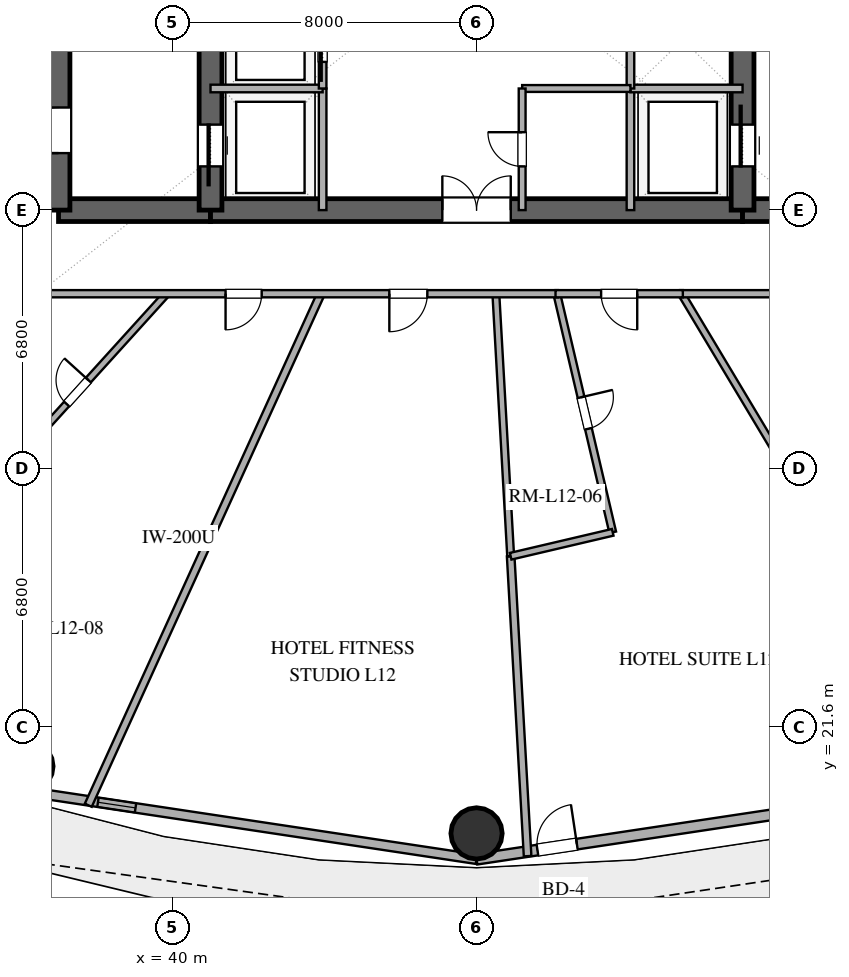
"""IFC4 building model, lengths in metres.
Left out: names, types, materials, properties, quantities, classifications, styles, units other than length and angle.
Written with IfcOpenShell. Run it as: python <this file> out.ifc"""

import sys

from ifc_helpers import new_model, si_unit, direction, frame, frame_2d, origin, origin_2d, place, context, subcontext, project, spatial, rectangle, hollow_circle, extrude, element, fill, save


model = new_model("IFC4")
c1 = context("Model", 3, precision=1e-05, world=origin(), true_north=direction((0.0, 1.0)))
c2 = subcontext(c1, "Body", "Model", "MODEL_VIEW")
j1 = project(units=[si_unit("LENGTHUNIT", "METRE"), si_unit("PLANEANGLEUNIT", "RADIAN")], contexts=[c1])
p1 = place(None, origin())
s1 = spatial("IfcSite", under=j1, at=p1, CompositionType="ELEMENT")
p2 = place(p1, origin())
s2 = spatial("IfcBuilding", under=s1, at=p2, CompositionType="ELEMENT")
p3 = place(p2, frame((0.0, 0.0, 53.4)))
s3 = spatial("IfcBuildingStorey", under=s2, at=p3, CompositionType="ELEMENT", Elevation=53.4)
p4 = place(p3, frame((37.0, 35.2, 0.0), z_axis=(0.0, 0.0, 1.0), x_axis=(1.0, 0.0, 0.0)))
e1 = element("IfcWall", 1, at=p4, inside=s3, PredefinedType="SHEAR", context=c2, shape_type="SweptSolid", body=[
    extrude(rectangle(XDim=4.0, YDim=0.6, at=frame_2d((2.0, 0.0))), origin(), (0.0, 0.0, 1.0), 3.38),
])
p5 = place(p3, frame((41.0, 35.2, 0.0), z_axis=(0.0, 0.0, 1.0), x_axis=(1.0, 0.0, 0.0)))
e2 = element("IfcWall", 2, at=p5, inside=s3, PredefinedType="SHEAR", context=c2, shape_type="SweptSolid", body=[
    extrude(rectangle(XDim=14.0, YDim=0.6, at=frame_2d((7.0, 0.0))), origin(), (0.0, 0.0, 1.0), 3.38),
])
p6 = place(p5, frame((6.1, 0.0, 0.0)))
e3 = element("IfcOpeningElement", 3, at=p6, cuts=e2, PredefinedType="OPENING", context=c2, shape_type="SweptSolid", body=[
    extrude(rectangle(XDim=1.8, YDim=2.25, at=frame_2d((0.9, 1.125))), frame((0.0, 0.31, 0.0), z_axis=(0.0, -1.0, 0.0), x_axis=(1.0, 0.0, 0.0)), (0.0, 0.0, 1.0), 0.62),
])
p7 = place(p3, frame((55.0, 35.2, 0.0), z_axis=(0.0, 0.0, 1.0), x_axis=(1.0, 0.0, 0.0)))
e4 = element("IfcWall", 4, at=p7, inside=s3, PredefinedType="SHEAR", context=c2, shape_type="SweptSolid", body=[
    extrude(rectangle(XDim=4.0, YDim=0.6, at=frame_2d((2.0, 0.0))), origin(), (0.0, 0.0, 1.0), 3.38),
])
p8 = place(p3, frame((37.0, 35.2, 0.0), z_axis=(0.0, 0.0, 1.0), x_axis=(0.0, 1.0, 0.0)))
e5 = element("IfcWall", 5, at=p8, inside=s3, PredefinedType="SHEAR", context=c2, shape_type="SweptSolid", body=[
    extrude(rectangle(XDim=13.6, YDim=0.6, at=frame_2d((6.8, 0.0))), origin(), (0.0, 0.0, 1.0), 3.38),
])
p9 = place(p8, frame((1.5, 0.0, 0.0)))
e6 = element("IfcOpeningElement", 6, at=p9, cuts=e5, PredefinedType="OPENING", context=c2, shape_type="SweptSolid", body=[
    extrude(rectangle(XDim=1.2, YDim=2.15, at=frame_2d((0.6, 1.075))), frame((0.0, 0.31, 0.0), z_axis=(0.0, -1.0, 0.0), x_axis=(1.0, 0.0, 0.0)), (0.0, 0.0, 1.0), 0.62),
])
p10 = place(p3, frame((41.0, 35.2, 0.0), z_axis=(0.0, 0.0, 1.0), x_axis=(0.0, 1.0, 0.0)))
e7 = element("IfcWall", 7, at=p10, inside=s3, PredefinedType="SHEAR", context=c2, shape_type="SweptSolid", body=[
    extrude(rectangle(XDim=13.6, YDim=0.6, at=frame_2d((6.8, 0.0))), origin(), (0.0, 0.0, 1.0), 3.38),
])
p11 = place(p10, frame((1.15, 0.0, 0.0)))
e8 = element("IfcOpeningElement", 8, at=p11, cuts=e7, PredefinedType="OPENING", context=c2, shape_type="SweptSolid", body=[
    extrude(rectangle(XDim=1.1, YDim=2.2, at=frame_2d((0.55, 1.1))), frame((0.0, 0.31, 0.0), z_axis=(0.0, -1.0, 0.0), x_axis=(1.0, 0.0, 0.0)), (0.0, 0.0, 1.0), 0.62),
])
p12 = place(p3, frame((55.0, 35.2, 0.0), z_axis=(0.0, 0.0, 1.0), x_axis=(0.0, 1.0, 0.0)))
e9 = element("IfcWall", 9, at=p12, inside=s3, PredefinedType="SHEAR", context=c2, shape_type="SweptSolid", body=[
    extrude(rectangle(XDim=13.6, YDim=0.6, at=frame_2d((6.8, 0.0))), origin(), (0.0, 0.0, 1.0), 3.38),
])
p13 = place(p12, frame((1.15, 0.0, 0.0)))
e10 = element("IfcOpeningElement", 10, at=p13, cuts=e9, PredefinedType="OPENING", context=c2, shape_type="SweptSolid", body=[
    extrude(rectangle(XDim=1.1, YDim=2.2, at=frame_2d((0.55, 1.1))), frame((0.0, 0.31, 0.0), z_axis=(0.0, -1.0, 0.0), x_axis=(1.0, 0.0, 0.0)), (0.0, 0.0, 1.0), 0.62),
])
for number, where, z_axis, x_axis in (
    (11, (36.182, 20.566, 0.0), (0.0, 0.0, 1.0), (1.0, 0.0, 0.0)),
    (12, (48.0, 18.8, 0.0), (0.0, 0.0, 1.0), (1.0, 0.0, 0.0)),
):
    element("IfcColumn", number, at=place(p3, frame(where, z_axis=z_axis, x_axis=x_axis)), inside=s3, PredefinedType="COLUMN", context=c2, shape_type="SweptSolid", body=[
        extrude(hollow_circle(Radius=0.675, WallThickness=0.036, at=origin_2d()), origin(), (0.0, 0.0, 1.0), 3.38),
    ])
p14 = place(p3, frame((35.922, 19.938, 0.0), z_axis=(0.0, 0.0, 1.0), x_axis=(0.988864835849, -0.148816452121, 0.0)))
e13 = element("IfcWall", 13, at=p14, inside=s3, PredefinedType="SOLIDWALL", context=c2, shape_type="SweptSolid", body=[
    extrude(rectangle(XDim=12.214, YDim=0.25, at=frame_2d((6.107, 0.0))), origin(), (0.0, 0.0, 1.0), 3.38),
])
p15 = place(p14, frame((2.139, 0.0, 1.42)))
e14 = element("IfcOpeningElement", 14, at=p15, cuts=e13, PredefinedType="OPENING", context=c2, shape_type="SweptSolid", body=[
    extrude(rectangle(XDim=1.0, YDim=1.05, at=frame_2d((0.5, 0.525))), frame((0.0, 0.135, 0.0), z_axis=(0.0, -1.0, 0.0), x_axis=(1.0, 0.0, 0.0)), (0.0, 0.0, 1.0), 0.27),
])
p16 = place(p3, frame((48.0, 18.12, 0.0), z_axis=(0.0, 0.0, 1.0), x_axis=(0.988864835849, 0.148816452121, 0.0)))
e15 = element("IfcWall", 15, at=p16, inside=s3, PredefinedType="SOLIDWALL", context=c2, shape_type="SweptSolid", body=[
    extrude(rectangle(XDim=12.214, YDim=0.28, at=frame_2d((6.107, 0.0))), origin(), (0.0, 0.0, 1.0), 3.38),
])
p17 = place(p16, frame((1.621, 0.0, 0.0)))
e16 = element("IfcOpeningElement", 16, at=p17, cuts=e15, PredefinedType="OPENING", context=c2, shape_type="SweptSolid", body=[
    extrude(rectangle(XDim=1.05, YDim=2.2, at=frame_2d((0.525, 1.1))), frame((0.0, 0.15, 0.0), z_axis=(0.0, -1.0, 0.0), x_axis=(1.0, 0.0, 0.0)), (0.0, 0.0, 1.0), 0.3),
])
p18 = place(p3, frame((43.95, 35.2, 0.0), z_axis=(0.0, 0.0, 1.0), x_axis=(0.0, 1.0, 0.0)))
e17 = element("IfcWall", 17, at=p18, inside=s3, PredefinedType="SOLIDWALL", context=c2, shape_type="SweptSolid", body=[
    extrude(rectangle(XDim=3.2, YDim=0.2, at=frame_2d((1.6, 0.0))), origin(), (0.0, 0.0, 1.0), 2.74),
])
p19 = place(p3, frame((41.0, 38.4, 0.0), z_axis=(0.0, 0.0, 1.0), x_axis=(1.0, 0.0, 0.0)))
e18 = element("IfcWall", 18, at=p19, inside=s3, PredefinedType="SOLIDWALL", context=c2, shape_type="SweptSolid", body=[
    extrude(rectangle(XDim=2.95, YDim=0.2, at=frame_2d((1.475, 0.0))), origin(), (0.0, 0.0, 1.0), 2.74),
])
p20 = place(p3, frame((52.05, 35.2, 0.0), z_axis=(0.0, 0.0, 1.0), x_axis=(0.0, 1.0, 0.0)))
e19 = element("IfcWall", 19, at=p20, inside=s3, PredefinedType="SOLIDWALL", context=c2, shape_type="SweptSolid", body=[
    extrude(rectangle(XDim=3.2, YDim=0.2, at=frame_2d((1.6, 0.0))), origin(), (0.0, 0.0, 1.0), 2.74),
])
p21 = place(p3, frame((52.05, 38.4, 0.0), z_axis=(0.0, 0.0, 1.0), x_axis=(1.0, 0.0, 0.0)))
e20 = element("IfcWall", 20, at=p21, inside=s3, PredefinedType="SOLIDWALL", context=c2, shape_type="SweptSolid", body=[
    extrude(rectangle(XDim=2.95, YDim=0.2, at=frame_2d((1.475, 0.0))), origin(), (0.0, 0.0, 1.0), 2.74),
])
p22 = place(p3, frame((43.95, 38.4, 0.0), z_axis=(0.0, 0.0, 1.0), x_axis=(0.0, 1.0, 0.0)))
e21 = element("IfcWall", 21, at=p22, inside=s3, PredefinedType="SOLIDWALL", context=c2, shape_type="SweptSolid", body=[
    extrude(rectangle(XDim=7.8, YDim=0.2, at=frame_2d((3.9, 0.0))), origin(), (0.0, 0.0, 1.0), 2.74),
])
p23 = place(p22, frame((0.7, 0.0, 0.0)))
e22 = element("IfcOpeningElement", 22, at=p23, cuts=e21, PredefinedType="OPENING", context=c2, shape_type="SweptSolid", body=[
    extrude(rectangle(XDim=1.1, YDim=2.2, at=frame_2d((0.55, 1.1))), frame((0.0, 0.11, 0.0), z_axis=(0.0, -1.0, 0.0), x_axis=(1.0, 0.0, 0.0)), (0.0, 0.0, 1.0), 0.22),
])
p24 = place(p22, frame((3.3, 0.0, 0.0)))
e23 = element("IfcOpeningElement", 23, at=p24, cuts=e21, PredefinedType="OPENING", context=c2, shape_type="SweptSolid", body=[
    extrude(rectangle(XDim=1.1, YDim=2.2, at=frame_2d((0.55, 1.1))), frame((0.0, 0.11, 0.0), z_axis=(0.0, -1.0, 0.0), x_axis=(1.0, 0.0, 0.0)), (0.0, 0.0, 1.0), 0.22),
])
p25 = place(p3, frame((52.05, 38.4, 0.0), z_axis=(0.0, 0.0, 1.0), x_axis=(0.0, 1.0, 0.0)))
e24 = element("IfcWall", 24, at=p25, inside=s3, PredefinedType="SOLIDWALL", context=c2, shape_type="SweptSolid", body=[
    extrude(rectangle(XDim=10.4, YDim=0.2, at=frame_2d((5.2, 0.0))), origin(), (0.0, 0.0, 1.0), 2.74),
])
p26 = place(p25, frame((8.2, 0.0, 0.0)))
e25 = element("IfcOpeningElement", 25, at=p26, cuts=e24, PredefinedType="OPENING", context=c2, shape_type="SweptSolid", body=[
    extrude(rectangle(XDim=1.2, YDim=2.2, at=frame_2d((0.6, 1.1))), frame((0.0, 0.11, 0.0), z_axis=(0.0, -1.0, 0.0), x_axis=(1.0, 0.0, 0.0)), (0.0, 0.0, 1.0), 0.22),
])
p27 = place(p3, frame((49.2, 38.4, 0.0), z_axis=(0.0, 0.0, 1.0), x_axis=(1.0, 0.0, 0.0)))
e26 = element("IfcWall", 26, at=p27, inside=s3, PredefinedType="PLUMBINGWALL", context=c2, shape_type="SweptSolid", body=[
    extrude(rectangle(XDim=2.85, YDim=0.18, at=frame_2d((1.425, 0.0))), origin(), (0.0, 0.0, 1.0), 2.74),
])
p28 = place(p3, frame((49.2, 35.2, 0.0), z_axis=(0.0, 0.0, 1.0), x_axis=(0.0, 1.0, 0.0)))
e27 = element("IfcWall", 27, at=p28, inside=s3, PredefinedType="PLUMBINGWALL", context=c2, shape_type="SweptSolid", body=[
    extrude(rectangle(XDim=3.2, YDim=0.18, at=frame_2d((1.6, 0.0))), origin(), (0.0, 0.0, 1.0), 2.74),
])
p29 = place(p28, frame((1.15, 0.0, 0.0)))
e28 = element("IfcOpeningElement", 28, at=p29, cuts=e27, PredefinedType="OPENING", context=c2, shape_type="SweptSolid", body=[
    extrude(rectangle(XDim=0.9, YDim=2.1, at=frame_2d((0.45, 1.05))), frame((0.0, 0.1, 0.0), z_axis=(0.0, -1.0, 0.0), x_axis=(1.0, 0.0, 0.0)), (0.0, 0.0, 1.0), 0.2),
])
p30 = place(p3, frame((37.783, 19.541, 0.0), z_axis=(0.0, 0.0, 1.0), x_axis=(0.414087801136, 0.910236943301, 0.0)))
e29 = element("IfcWall", 29, at=p30, inside=s3, PredefinedType="PARTITIONING", context=c2, shape_type="SweptSolid", body=[
    extrude(rectangle(XDim=14.786, YDim=0.2, at=frame_2d((7.393, 0.0))), origin(), (0.0, 0.0, 1.0), 2.74),
])
p31 = place(p3, frame((49.344, 18.201, 0.0), z_axis=(0.0, 0.0, 1.0), x_axis=(-0.056375038978, 0.998409662904, 0.0)))
e30 = element("IfcWall", 30, at=p31, inside=s3, PredefinedType="PARTITIONING", context=c2, shape_type="SweptSolid", body=[
    extrude(rectangle(XDim=7.903, YDim=0.2, at=frame_2d((3.952, 0.0))), origin(), (0.0, 0.0, 1.0), 2.74),
])
p32 = place(p3, frame((57.124, 26.769, 0.0), z_axis=(0.0, 0.0, 1.0), x_axis=(-0.513872793929, 0.857866394994, 0.0)))
e31 = element("IfcWall", 31, at=p32, inside=s3, PredefinedType="PLUMBINGWALL", context=c2, shape_type="SweptSolid", body=[
    extrude(rectangle(XDim=7.263, YDim=0.18, at=frame_2d((3.632, 0.0))), origin(), (0.0, 0.0, 1.0), 2.74),
])
p33 = place(p3, frame((35.155, 27.826, 0.0), z_axis=(0.0, 0.0, 1.0), x_axis=(0.671533822983, 0.740973902773, 0.0)))
e32 = element("IfcWall", 32, at=p33, inside=s3, PredefinedType="PLUMBINGWALL", context=c2, shape_type="SweptSolid", body=[
    extrude(rectangle(XDim=6.982, YDim=0.18, at=frame_2d((3.491, 0.0))), origin(), (0.0, 0.0, 1.0), 2.74),
])
p34 = place(p33, frame((3.066, 0.0, 0.0)))
e33 = element("IfcOpeningElement", 33, at=p34, cuts=e32, PredefinedType="OPENING", context=c2, shape_type="SweptSolid", body=[
    extrude(rectangle(XDim=0.85, YDim=2.1, at=frame_2d((0.425, 1.05))), frame((0.0, 0.1, 0.0), z_axis=(0.0, -1.0, 0.0), x_axis=(1.0, 0.0, 0.0)), (0.0, 0.0, 1.0), 0.2),
])
p35 = place(p3, frame((48.898, 26.092, 0.0), z_axis=(0.0, 0.0, 1.0), x_axis=(-0.056353367692, 0.998410886334, 0.0)))
e34 = element("IfcWall", 34, at=p35, inside=s3, PredefinedType="PLUMBINGWALL", context=c2, shape_type="SweptSolid", body=[
    extrude(rectangle(XDim=6.919, YDim=0.18, at=frame_2d((3.459, 0.0))), origin(), (0.0, 0.0, 1.0), 2.74),
])
p36 = place(p3, frame((50.111, 33.0, 0.0), z_axis=(0.0, 0.0, 1.0), x_axis=(0.228380862789, -0.973571867666, 0.0)))
e35 = element("IfcWall", 35, at=p36, inside=s3, PredefinedType="PLUMBINGWALL", context=c2, shape_type="SweptSolid", body=[
    extrude(rectangle(XDim=6.448, YDim=0.18, at=frame_2d((3.224, 0.0))), origin(), (0.0, 0.0, 1.0), 2.74),
])
p37 = place(p36, frame((2.799, 0.0, 0.0)))
e36 = element("IfcOpeningElement", 36, at=p37, cuts=e35, PredefinedType="OPENING", context=c2, shape_type="SweptSolid", body=[
    extrude(rectangle(XDim=0.85, YDim=2.1, at=frame_2d((0.425, 1.05))), frame((0.0, 0.1, 0.0), z_axis=(0.0, -1.0, 0.0), x_axis=(1.0, 0.0, 0.0)), (0.0, 0.0, 1.0), 0.2),
])
p38 = place(p3, frame((61.2, 33.0, 0.0), z_axis=(0.0, 0.0, 1.0), x_axis=(-1.0, 0.0, 0.0)))
e37 = element("IfcWall", 37, at=p38, inside=s3, PredefinedType="PARTITIONING", context=c2, shape_type="SweptSolid", body=[
    extrude(rectangle(XDim=7.846, YDim=0.19, at=frame_2d((3.923, 0.0))), origin(), (0.0, 0.0, 1.0), 2.74),
])
p39 = place(p38, frame((2.249, 0.0, 0.0)))
e38 = element("IfcOpeningElement", 38, at=p39, cuts=e37, PredefinedType="OPENING", context=c2, shape_type="SweptSolid", body=[
    extrude(rectangle(XDim=0.95, YDim=2.15, at=frame_2d((0.475, 1.075))), frame((0.0, 0.105, 0.0), z_axis=(0.0, -1.0, 0.0), x_axis=(1.0, 0.0, 0.0)), (0.0, 0.0, 1.0), 0.21),
])
p40 = place(p3, frame((50.144, 33.0, 0.0), z_axis=(0.0, 0.0, 1.0), x_axis=(-1.0, 0.0, 0.0)))
e39 = element("IfcWall", 39, at=p40, inside=s3, PredefinedType="PARTITIONING", context=c2, shape_type="SweptSolid", body=[
    extrude(rectangle(XDim=15.344, YDim=0.19, at=frame_2d((7.672, 0.0))), origin(), (0.0, 0.0, 1.0), 2.74),
])
p41 = place(p40, frame((3.438, 0.0, 0.0)))
e40 = element("IfcOpeningElement", 40, at=p41, cuts=e39, PredefinedType="OPENING", context=c2, shape_type="SweptSolid", body=[
    extrude(rectangle(XDim=1.0, YDim=2.2, at=frame_2d((0.5, 1.1))), frame((0.0, 0.105, 0.0), z_axis=(0.0, -1.0, 0.0), x_axis=(1.0, 0.0, 0.0)), (0.0, 0.0, 1.0), 0.21),
])
p42 = place(p40, frame((7.798, 0.0, 0.0)))
e41 = element("IfcOpeningElement", 41, at=p42, cuts=e39, PredefinedType="OPENING", context=c2, shape_type="SweptSolid", body=[
    extrude(rectangle(XDim=0.95, YDim=2.15, at=frame_2d((0.475, 1.075))), frame((0.0, 0.105, 0.0), z_axis=(0.0, -1.0, 0.0), x_axis=(1.0, 0.0, 0.0)), (0.0, 0.0, 1.0), 0.21),
])
p43 = place(p3, frame((53.429, 33.0, 0.0), z_axis=(0.0, 0.0, 1.0), x_axis=(-1.0, 0.0, 0.0)))
e42 = element("IfcWall", 42, at=p43, inside=s3, PredefinedType="PARTITIONING", context=c2, shape_type="SweptSolid", body=[
    extrude(rectangle(XDim=3.351, YDim=0.19, at=frame_2d((1.675, 0.0))), origin(), (0.0, 0.0, 1.0), 2.74),
])
p44 = place(p43, frame((1.2, 0.0, 0.0)))
e43 = element("IfcOpeningElement", 43, at=p44, cuts=e42, PredefinedType="OPENING", context=c2, shape_type="SweptSolid", body=[
    extrude(rectangle(XDim=0.95, YDim=2.15, at=frame_2d((0.475, 1.075))), frame((0.0, 0.105, 0.0), z_axis=(0.0, -1.0, 0.0), x_axis=(1.0, 0.0, 0.0)), (0.0, 0.0, 1.0), 0.21),
])
p45 = place(p3, frame((51.583, 26.722, 0.0), z_axis=(0.0, 0.0, 1.0), x_axis=(-0.973579428385, -0.228348629567, 0.0)))
e44 = element("IfcWall", 44, at=p45, inside=s3, PredefinedType="PLUMBINGWALL", context=c2, shape_type="SweptSolid", body=[
    extrude(rectangle(XDim=2.759, YDim=0.18, at=frame_2d((1.379, 0.0))), origin(), (0.0, 0.0, 1.0), 2.74),
])
p46 = place(p17, origin())
e45 = element("IfcDoor", 45, at=p46, inside=s3, OperationType="SINGLE_SWING_RIGHT", PredefinedType="DOOR", context=c2, shape_type="SweptSolid", body=[
    extrude(rectangle(XDim=1.05, YDim=2.2, at=frame_2d((0.525, 1.1))), frame((0.0, 0.025, 0.0), z_axis=(0.0, -1.0, 0.0), x_axis=(1.0, 0.0, 0.0)), (0.0, 0.0, 1.0), 0.05),
])
fill(e16, e45)
p47 = place(p15, origin())
e46 = element("IfcWindow", 46, at=p47, inside=s3, PartitioningType="SINGLE_PANEL", PredefinedType="WINDOW", context=c2, shape_type="SweptSolid", body=[
    extrude(rectangle(XDim=1.0, YDim=1.05, at=frame_2d((0.5, 0.525))), frame((0.0, 0.03, 0.0), z_axis=(0.0, -1.0, 0.0), x_axis=(1.0, 0.0, 0.0)), (0.0, 0.0, 1.0), 0.06),
])
fill(e14, e46)
p48 = place(p11, origin())
e47 = element("IfcDoor", 47, at=p48, inside=s3, OperationType="SLIDING_TO_LEFT", PredefinedType="DOOR", context=c2, shape_type="SweptSolid", body=[
    extrude(rectangle(XDim=1.1, YDim=2.2, at=frame_2d((0.55, 1.1))), frame((0.0, 0.025, 0.0), z_axis=(0.0, -1.0, 0.0), x_axis=(1.0, 0.0, 0.0)), (0.0, 0.0, 1.0), 0.05),
])
fill(e8, e47)
p49 = place(p13, origin())
e48 = element("IfcDoor", 48, at=p49, inside=s3, OperationType="SLIDING_TO_RIGHT", PredefinedType="DOOR", context=c2, shape_type="SweptSolid", body=[
    extrude(rectangle(XDim=1.1, YDim=2.2, at=frame_2d((0.55, 1.1))), frame((0.0, 0.025, 0.0), z_axis=(0.0, -1.0, 0.0), x_axis=(1.0, 0.0, 0.0)), (0.0, 0.0, 1.0), 0.05),
])
fill(e10, e48)
p50 = place(p9, origin())
e49 = element("IfcDoor", 49, at=p50, inside=s3, OperationType="SINGLE_SWING_LEFT", PredefinedType="DOOR", context=c2, shape_type="SweptSolid", body=[
    extrude(rectangle(XDim=1.2, YDim=2.15, at=frame_2d((0.6, 1.075))), frame((0.0, 0.025, 0.0), z_axis=(0.0, -1.0, 0.0), x_axis=(1.0, 0.0, 0.0)), (0.0, 0.0, 1.0), 0.05),
])
fill(e6, e49)
p51 = place(p6, origin())
e50 = element("IfcDoor", 50, at=p51, inside=s3, OperationType="DOUBLE_DOOR_SINGLE_SWING", PredefinedType="DOOR", context=c2, shape_type="SweptSolid", body=[
    extrude(rectangle(XDim=1.8, YDim=2.25, at=frame_2d((0.9, 1.125))), frame((0.0, 0.025, 0.0), z_axis=(0.0, -1.0, 0.0), x_axis=(1.0, 0.0, 0.0)), (0.0, 0.0, 1.0), 0.05),
])
fill(e3, e50)
p52 = place(p23, origin())
e51 = element("IfcDoor", 51, at=p52, inside=s3, OperationType="SLIDING_TO_LEFT", PredefinedType="DOOR", context=c2, shape_type="SweptSolid", body=[
    extrude(rectangle(XDim=1.1, YDim=2.2, at=frame_2d((0.55, 1.1))), frame((0.0, 0.025, 0.0), z_axis=(0.0, -1.0, 0.0), x_axis=(1.0, 0.0, 0.0)), (0.0, 0.0, 1.0), 0.05),
])
fill(e22, e51)
p53 = place(p29, origin())
e52 = element("IfcDoor", 52, at=p53, inside=s3, OperationType="SINGLE_SWING_RIGHT", PredefinedType="DOOR", context=c2, shape_type="SweptSolid", body=[
    extrude(rectangle(XDim=0.9, YDim=2.1, at=frame_2d((0.45, 1.05))), frame((0.0, 0.025, 0.0), z_axis=(0.0, -1.0, 0.0), x_axis=(1.0, 0.0, 0.0)), (0.0, 0.0, 1.0), 0.05),
])
fill(e28, e52)
p54 = place(p34, origin())
e53 = element("IfcDoor", 53, at=p54, inside=s3, OperationType="SINGLE_SWING_RIGHT", PredefinedType="DOOR", context=c2, shape_type="SweptSolid", body=[
    extrude(rectangle(XDim=0.85, YDim=2.1, at=frame_2d((0.425, 1.05))), frame((0.0, 0.025, 0.0), z_axis=(0.0, -1.0, 0.0), x_axis=(1.0, 0.0, 0.0)), (0.0, 0.0, 1.0), 0.05),
])
fill(e33, e53)
p55 = place(p37, origin())
e54 = element("IfcDoor", 54, at=p55, inside=s3, OperationType="SINGLE_SWING_LEFT", PredefinedType="DOOR", context=c2, shape_type="SweptSolid", body=[
    extrude(rectangle(XDim=0.85, YDim=2.1, at=frame_2d((0.425, 1.05))), frame((0.0, 0.025, 0.0), z_axis=(0.0, -1.0, 0.0), x_axis=(1.0, 0.0, 0.0)), (0.0, 0.0, 1.0), 0.05),
])
fill(e36, e54)
p56 = place(p41, origin())
e55 = element("IfcDoor", 55, at=p56, inside=s3, OperationType="SINGLE_SWING_RIGHT", PredefinedType="DOOR", context=c2, shape_type="SweptSolid", body=[
    extrude(rectangle(XDim=1.0, YDim=2.2, at=frame_2d((0.5, 1.1))), frame((0.0, 0.025, 0.0), z_axis=(0.0, -1.0, 0.0), x_axis=(1.0, 0.0, 0.0)), (0.0, 0.0, 1.0), 0.05),
])
fill(e40, e55)
p57 = place(p42, origin())
e56 = element("IfcDoor", 56, at=p57, inside=s3, OperationType="SINGLE_SWING_RIGHT", PredefinedType="DOOR", context=c2, shape_type="SweptSolid", body=[
    extrude(rectangle(XDim=0.95, YDim=2.15, at=frame_2d((0.475, 1.075))), frame((0.0, 0.025, 0.0), z_axis=(0.0, -1.0, 0.0), x_axis=(1.0, 0.0, 0.0)), (0.0, 0.0, 1.0), 0.05),
])
fill(e41, e56)
p58 = place(p44, origin())
e57 = element("IfcDoor", 57, at=p58, inside=s3, OperationType="SINGLE_SWING_LEFT", PredefinedType="DOOR", context=c2, shape_type="SweptSolid", body=[
    extrude(rectangle(XDim=0.95, YDim=2.15, at=frame_2d((0.475, 1.075))), frame((0.0, 0.025, 0.0), z_axis=(0.0, -1.0, 0.0), x_axis=(1.0, 0.0, 0.0)), (0.0, 0.0, 1.0), 0.05),
])
fill(e43, e57)
save(model, sys.argv[1])
